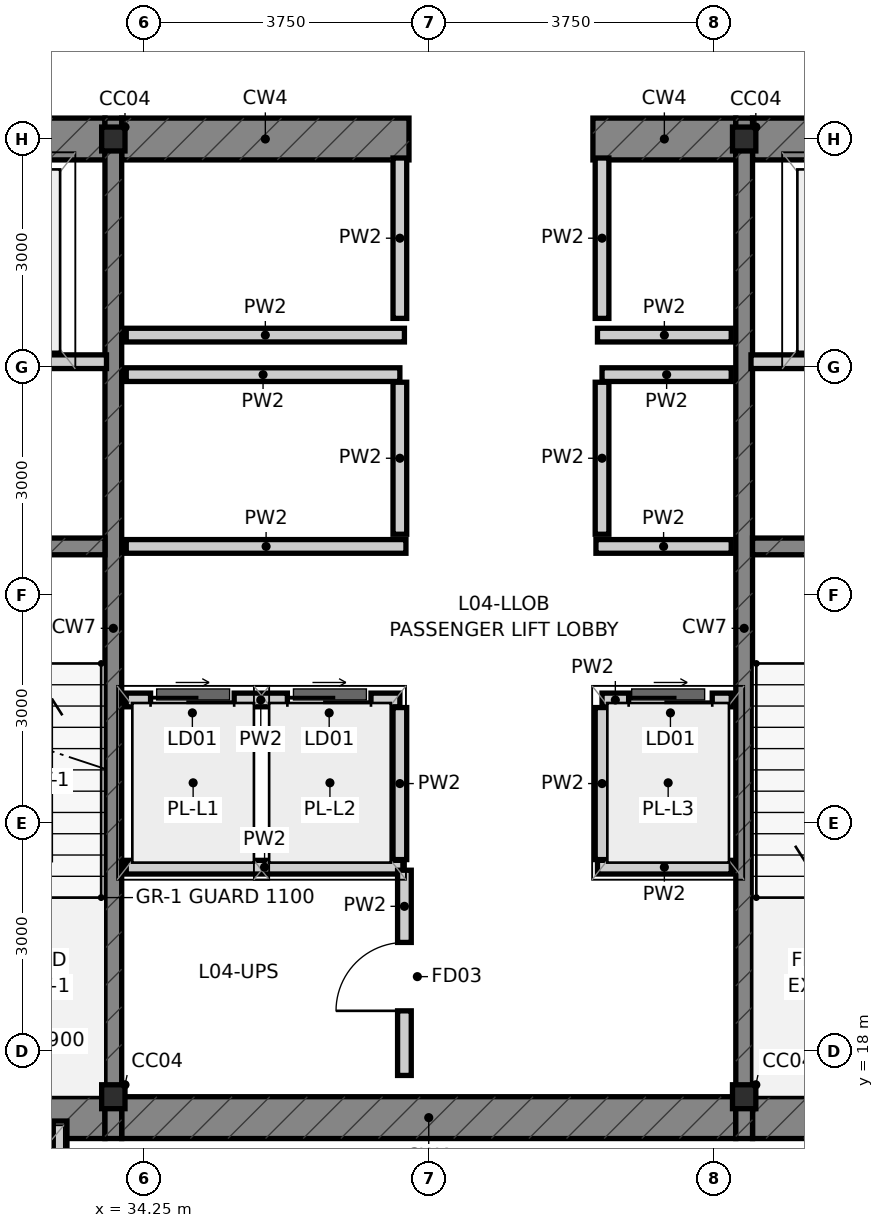
"""IFC4 building model, lengths in metres.
Left out: names, types, materials, properties, quantities, classifications, styles, units other than length and angle.
Written with IfcOpenShell. Run it as: python <this file> out.ifc"""

import sys

from ifc_helpers import new_model, si_unit, direction, frame, frame_2d, origin, origin_2d, place, context, subcontext, project, spatial, rectangle, i_section, extrude, source, transform, mapped, element, fill, save


model = new_model("IFC4")
c1 = context("Model", 3, precision=1e-05, world=origin(), true_north=direction((0.0, 1.0)))
c2 = subcontext(c1, "Body", "Model", "MODEL_VIEW")
j1 = project(units=[si_unit("LENGTHUNIT", "METRE"), si_unit("PLANEANGLEUNIT", "RADIAN")], contexts=[c1])
p1 = place(None, origin())
s1 = spatial("IfcSite", under=j1, at=p1, CompositionType="ELEMENT")
p2 = place(p1, origin())
s2 = spatial("IfcBuilding", under=s1, at=p2, CompositionType="ELEMENT")
p3 = place(p2, frame((0.0, 0.0, 18.9)))
s3 = spatial("IfcBuildingStorey", under=s2, at=p3, CompositionType="ELEMENT", Elevation=18.9)
m1 = source(origin(), c2, "Body", "SweptSolid", [
    extrude(i_section(OverallWidth=0.307, OverallDepth=0.315, WebThickness=0.012, FlangeThickness=0.019, at=origin_2d()), origin(), (0.0, 0.0, 1.0), 4.2),
])
for number, where, z_axis, x_axis in (
    (1, (33.85, 17.4, 0.0), (0.0, 0.0, 1.0), (1.0, 0.0, 0.0)),
    (2, (42.15, 17.4, 0.0), (0.0, 0.0, 1.0), (1.0, 0.0, 0.0)),
    (3, (33.85, 30.0, 0.0), (0.0, 0.0, 1.0), (1.0, 0.0, 0.0)),
    (4, (42.15, 30.0, 0.0), (0.0, 0.0, 1.0), (1.0, 0.0, 0.0)),
):
    element("IfcColumn", number, at=place(p3, frame(where, z_axis=z_axis, x_axis=x_axis)), inside=s3, PredefinedType="COLUMN", context=c2, shape_type="MappedRepresentation", body=[
        mapped(m1, transform((0.0, 0.0, 0.0), scale=1.0)),
    ])
p4 = place(p3, frame((30.84, 17.125, 0.0), z_axis=(0.0, 0.0, 1.0), x_axis=(1.0, 0.0, 0.0)))
e5 = element("IfcWall", 5, at=p4, inside=s3, PredefinedType="SHEAR", context=c2, shape_type="SweptSolid", body=[
    extrude(rectangle(XDim=2.9, YDim=0.55, at=frame_2d((1.45, 0.0))), origin(), (0.0, 0.0, 1.0), 4.2),
])
p5 = place(p3, frame((33.96, 17.125, 0.0), z_axis=(0.0, 0.0, 1.0), x_axis=(1.0, 0.0, 0.0)))
e6 = element("IfcWall", 6, at=p5, inside=s3, PredefinedType="SHEAR", context=c2, shape_type="SweptSolid", body=[
    extrude(rectangle(XDim=8.08, YDim=0.55, at=frame_2d((4.04, 0.0))), origin(), (0.0, 0.0, 1.0), 4.2),
])
for number, where, z_axis, x_axis in (
    (7, (42.26, 17.125, 0.0), (0.0, 0.0, 1.0), (1.0, 0.0, 0.0)),
    (8, (30.84, 30.0, 0.0), (0.0, 0.0, 1.0), (1.0, 0.0, 0.0)),
):
    element("IfcWall", number, at=place(p3, frame(where, z_axis=z_axis, x_axis=x_axis)), inside=s3, PredefinedType="SHEAR", context=c2, shape_type="SweptSolid", body=[
        extrude(rectangle(XDim=2.9, YDim=0.55, at=frame_2d((1.45, 0.0))), origin(), (0.0, 0.0, 1.0), 4.2),
    ])
p6 = place(p3, frame((33.96, 30.0, 0.0), z_axis=(0.0, 0.0, 1.0), x_axis=(1.0, 0.0, 0.0)))
e9 = element("IfcWall", 9, at=p6, inside=s3, PredefinedType="SHEAR", context=c2, shape_type="SweptSolid", body=[
    extrude(rectangle(XDim=3.78, YDim=0.55, at=frame_2d((1.89, 0.0))), origin(), (0.0, 0.0, 1.0), 4.2),
])
p7 = place(p3, frame((40.16, 30.0, 0.0), z_axis=(0.0, 0.0, 1.0), x_axis=(1.0, 0.0, 0.0)))
e10 = element("IfcWall", 10, at=p7, inside=s3, PredefinedType="SHEAR", context=c2, shape_type="SweptSolid", body=[
    extrude(rectangle(XDim=1.88, YDim=0.55, at=frame_2d((0.94, 0.0))), origin(), (0.0, 0.0, 1.0), 4.2),
])
p8 = place(p3, frame((42.26, 30.0, 0.0), z_axis=(0.0, 0.0, 1.0), x_axis=(1.0, 0.0, 0.0)))
e11 = element("IfcWall", 11, at=p8, inside=s3, PredefinedType="SHEAR", context=c2, shape_type="SweptSolid", body=[
    extrude(rectangle(XDim=2.9, YDim=0.55, at=frame_2d((1.45, 0.0))), origin(), (0.0, 0.0, 1.0), 4.2),
])
for number, where, z_axis, x_axis in (
    (12, (33.85, 16.85, 0.0), (0.0, 0.0, 1.0), (0.0, 1.0, 0.0)),
    (13, (42.15, 16.85, 0.0), (0.0, 0.0, 1.0), (0.0, 1.0, 0.0)),
):
    element("IfcWall", number, at=place(p3, frame(where, z_axis=z_axis, x_axis=x_axis)), inside=s3, PredefinedType="SHEAR", context=c2, shape_type="SweptSolid", body=[
        extrude(rectangle(XDim=13.425, YDim=0.22, at=frame_2d((6.712, 0.0))), origin(), (0.0, 0.0, 1.0), 4.2),
    ])
for number, where, z_axis, x_axis in (
    (14, (30.84, 24.64, 0.0), (0.0, 0.0, 1.0), (1.0, 0.0, 0.0)),
    (15, (42.26, 24.64, 0.0), (0.0, 0.0, 1.0), (1.0, 0.0, 0.0)),
):
    element("IfcWall", number, at=place(p3, frame(where, z_axis=z_axis, x_axis=x_axis)), inside=s3, PredefinedType="SHEAR", context=c2, shape_type="SweptSolid", body=[
        extrude(rectangle(XDim=2.9, YDim=0.22, at=frame_2d((1.45, 0.0))), origin(), (0.0, 0.0, 1.0), 4.2),
    ])
p9 = place(p3, frame((33.15, 14.42, 0.0), z_axis=(0.0, 0.0, 1.0), x_axis=(0.0, 1.0, 0.0)))
e16 = element("IfcWall", 16, at=p9, inside=s3, PredefinedType="PARTITIONING", context=c2, shape_type="SweptSolid", body=[
    extrude(rectangle(XDim=2.66, YDim=0.18, at=frame_2d((1.33, 0.0))), origin(), (0.0, 0.0, 1.0), 3.75),
])
p10 = place(p3, frame((34.02, 22.62, 0.0), z_axis=(0.0, 0.0, 1.0), x_axis=(1.0, 0.0, 0.0)))
e17 = element("IfcWall", 17, at=p10, inside=s3, PredefinedType="PARTITIONING", context=c2, shape_type="SweptSolid", body=[
    extrude(rectangle(XDim=3.6, YDim=0.18, at=frame_2d((1.8, 0.0))), origin(), (0.0, 0.0, 1.0), 3.75),
])
p11 = place(p10, frame((0.32, 0.0, 0.0)))
e18 = element("IfcOpeningElement", 18, at=p11, cuts=e17, PredefinedType="OPENING", context=c2, shape_type="SweptSolid", body=[
    extrude(rectangle(XDim=1.1, YDim=2.2, at=frame_2d((0.55, 1.1))), frame((0.0, 0.102, 0.0), z_axis=(0.0, -1.0, 0.0), x_axis=(1.0, 0.0, 0.0)), (0.0, 0.0, 1.0), 0.204),
])
p12 = place(p10, frame((2.12, 0.0, 0.0)))
e19 = element("IfcOpeningElement", 19, at=p12, cuts=e17, PredefinedType="OPENING", context=c2, shape_type="SweptSolid", body=[
    extrude(rectangle(XDim=1.1, YDim=2.2, at=frame_2d((0.55, 1.1))), frame((0.0, 0.102, 0.0), z_axis=(0.0, -1.0, 0.0), x_axis=(1.0, 0.0, 0.0)), (0.0, 0.0, 1.0), 0.204),
])
p13 = place(p3, frame((40.28, 22.62, 0.0), z_axis=(0.0, 0.0, 1.0), x_axis=(1.0, 0.0, 0.0)))
e20 = element("IfcWall", 20, at=p13, inside=s3, PredefinedType="PARTITIONING", context=c2, shape_type="SweptSolid", body=[
    extrude(rectangle(XDim=1.7, YDim=0.18, at=frame_2d((0.85, 0.0))), origin(), (0.0, 0.0, 1.0), 3.75),
])
p14 = place(p13, frame((0.35, 0.0, 0.0)))
e21 = element("IfcOpeningElement", 21, at=p14, cuts=e20, PredefinedType="OPENING", context=c2, shape_type="SweptSolid", body=[
    extrude(rectangle(XDim=1.1, YDim=2.2, at=frame_2d((0.55, 1.1))), frame((0.0, 0.102, 0.0), z_axis=(0.0, -1.0, 0.0), x_axis=(1.0, 0.0, 0.0)), (0.0, 0.0, 1.0), 0.204),
])
for number, where, z_axis, x_axis in (
    (22, (37.62, 20.52, 0.0), (0.0, 0.0, 1.0), (0.0, 1.0, 0.0)),
    (23, (40.28, 20.52, 0.0), (0.0, 0.0, 1.0), (0.0, 1.0, 0.0)),
):
    element("IfcWall", number, at=place(p3, frame(where, z_axis=z_axis, x_axis=x_axis)), inside=s3, PredefinedType="PARTITIONING", context=c2, shape_type="SweptSolid", body=[
        extrude(rectangle(XDim=2.0, YDim=0.18, at=frame_2d((1.0, 0.0))), origin(), (0.0, 0.0, 1.0), 3.75),
    ])
p15 = place(p3, frame((34.02, 26.9, 0.0), z_axis=(0.0, 0.0, 1.0), x_axis=(1.0, 0.0, 0.0)))
e24 = element("IfcWall", 24, at=p15, inside=s3, PredefinedType="PARTITIONING", context=c2, shape_type="SweptSolid", body=[
    extrude(rectangle(XDim=3.6, YDim=0.18, at=frame_2d((1.8, 0.0))), origin(), (0.0, 0.0, 1.0), 3.75),
])
p16 = place(p3, frame((40.28, 26.9, 0.0), z_axis=(0.0, 0.0, 1.0), x_axis=(1.0, 0.0, 0.0)))
e25 = element("IfcWall", 25, at=p16, inside=s3, PredefinedType="PARTITIONING", context=c2, shape_type="SweptSolid", body=[
    extrude(rectangle(XDim=1.7, YDim=0.18, at=frame_2d((0.85, 0.0))), origin(), (0.0, 0.0, 1.0), 3.75),
])
for number, where, z_axis, x_axis in (
    (26, (37.62, 24.8, 0.0), (0.0, 0.0, 1.0), (0.0, 1.0, 0.0)),
    (27, (40.28, 24.8, 0.0), (0.0, 0.0, 1.0), (0.0, 1.0, 0.0)),
):
    element("IfcWall", number, at=place(p3, frame(where, z_axis=z_axis, x_axis=x_axis)), inside=s3, PredefinedType="PARTITIONING", context=c2, shape_type="SweptSolid", body=[
        extrude(rectangle(XDim=2.0, YDim=0.18, at=frame_2d((1.0, 0.0))), origin(), (0.0, 0.0, 1.0), 3.75),
    ])
p17 = place(p3, frame((34.02, 24.64, 0.0), z_axis=(0.0, 0.0, 1.0), x_axis=(1.0, 0.0, 0.0)))
e28 = element("IfcWall", 28, at=p17, inside=s3, PredefinedType="PARTITIONING", context=c2, shape_type="SweptSolid", body=[
    extrude(rectangle(XDim=3.68, YDim=0.18, at=frame_2d((1.84, 0.0))), origin(), (0.0, 0.0, 1.0), 3.75),
])
p18 = place(p3, frame((40.2, 24.64, 0.0), z_axis=(0.0, 0.0, 1.0), x_axis=(1.0, 0.0, 0.0)))
e29 = element("IfcWall", 29, at=p18, inside=s3, PredefinedType="PARTITIONING", context=c2, shape_type="SweptSolid", body=[
    extrude(rectangle(XDim=1.78, YDim=0.18, at=frame_2d((0.89, 0.0))), origin(), (0.0, 0.0, 1.0), 3.75),
])
p19 = place(p3, frame((34.02, 27.42, 0.0), z_axis=(0.0, 0.0, 1.0), x_axis=(1.0, 0.0, 0.0)))
e30 = element("IfcWall", 30, at=p19, inside=s3, PredefinedType="PARTITIONING", context=c2, shape_type="SweptSolid", body=[
    extrude(rectangle(XDim=3.66, YDim=0.18, at=frame_2d((1.83, 0.0))), origin(), (0.0, 0.0, 1.0), 3.75),
])
p20 = place(p3, frame((40.22, 27.42, 0.0), z_axis=(0.0, 0.0, 1.0), x_axis=(1.0, 0.0, 0.0)))
e31 = element("IfcWall", 31, at=p20, inside=s3, PredefinedType="PARTITIONING", context=c2, shape_type="SweptSolid", body=[
    extrude(rectangle(XDim=1.76, YDim=0.18, at=frame_2d((0.88, 0.0))), origin(), (0.0, 0.0, 1.0), 3.75),
])
for number, where, z_axis, x_axis in (
    (32, (37.62, 27.64, 0.0), (0.0, 0.0, 1.0), (0.0, 1.0, 0.0)),
    (33, (40.28, 27.64, 0.0), (0.0, 0.0, 1.0), (0.0, 1.0, 0.0)),
):
    element("IfcWall", number, at=place(p3, frame(where, z_axis=z_axis, x_axis=x_axis)), inside=s3, PredefinedType="PARTITIONING", context=c2, shape_type="SweptSolid", body=[
        extrude(rectangle(XDim=2.11, YDim=0.18, at=frame_2d((1.055, 0.0))), origin(), (0.0, 0.0, 1.0), 3.75),
    ])
for number, where, z_axis, x_axis in (
    (34, (30.86, 27.07, 0.0), (0.0, 0.0, 1.0), (1.0, 0.0, 0.0)),
    (35, (42.24, 27.07, 0.0), (0.0, 0.0, 1.0), (1.0, 0.0, 0.0)),
):
    element("IfcWall", number, at=place(p3, frame(where, z_axis=z_axis, x_axis=x_axis)), inside=s3, PredefinedType="PARTITIONING", context=c2, shape_type="SweptSolid", body=[
        extrude(rectangle(XDim=2.9, YDim=0.18, at=frame_2d((1.45, 0.0))), origin(), (0.0, 0.0, 1.0), 3.75),
    ])
p21 = place(p3, frame((34.02, 20.42, 0.0), z_axis=(0.0, 0.0, 1.0), x_axis=(1.0, 0.0, 0.0)))
e36 = element("IfcWall", 36, at=p21, inside=s3, PredefinedType="PARTITIONING", context=c2, shape_type="SweptSolid", body=[
    extrude(rectangle(XDim=3.64, YDim=0.18, at=frame_2d((1.82, 0.0))), origin(), (0.0, 0.0, 1.0), 3.75),
])
p22 = place(p3, frame((40.22, 20.42, 0.0), z_axis=(0.0, 0.0, 1.0), x_axis=(1.0, 0.0, 0.0)))
e37 = element("IfcWall", 37, at=p22, inside=s3, PredefinedType="PARTITIONING", context=c2, shape_type="SweptSolid", body=[
    extrude(rectangle(XDim=1.76, YDim=0.18, at=frame_2d((0.88, 0.0))), origin(), (0.0, 0.0, 1.0), 3.75),
])
p23 = place(p3, frame((37.68, 17.68, 0.0), z_axis=(0.0, 0.0, 1.0), x_axis=(0.0, 1.0, 0.0)))
e38 = element("IfcWall", 38, at=p23, inside=s3, PredefinedType="PARTITIONING", context=c2, shape_type="SweptSolid", body=[
    extrude(rectangle(XDim=2.7, YDim=0.18, at=frame_2d((1.35, 0.0))), origin(), (0.0, 0.0, 1.0), 3.75),
])
p24 = place(p23, frame((0.85, 0.0, 0.0)))
e39 = element("IfcOpeningElement", 39, at=p24, cuts=e38, PredefinedType="OPENING", context=c2, shape_type="SweptSolid", body=[
    extrude(rectangle(XDim=0.9, YDim=2.1, at=frame_2d((0.45, 1.05))), frame((0.0, 0.102, 0.0), z_axis=(0.0, -1.0, 0.0), x_axis=(1.0, 0.0, 0.0)), (0.0, 0.0, 1.0), 0.204),
])
p25 = place(p11, origin())
e40 = element("IfcDoor", 40, at=p25, inside=s3, OperationType="SLIDING_TO_LEFT", PredefinedType="DOOR", context=c2, shape_type="SweptSolid", body=[
    extrude(rectangle(XDim=1.1, YDim=2.2, at=frame_2d((0.55, 1.1))), frame((0.0, 0.025, 0.0), z_axis=(0.0, -1.0, 0.0), x_axis=(1.0, 0.0, 0.0)), (0.0, 0.0, 1.0), 0.05),
])
fill(e18, e40)
p26 = place(p12, origin())
e41 = element("IfcDoor", 41, at=p26, inside=s3, OperationType="SLIDING_TO_RIGHT", PredefinedType="DOOR", context=c2, shape_type="SweptSolid", body=[
    extrude(rectangle(XDim=1.1, YDim=2.2, at=frame_2d((0.55, 1.1))), frame((0.0, 0.025, 0.0), z_axis=(0.0, -1.0, 0.0), x_axis=(1.0, 0.0, 0.0)), (0.0, 0.0, 1.0), 0.05),
])
fill(e19, e41)
p27 = place(p14, origin())
e42 = element("IfcDoor", 42, at=p27, inside=s3, OperationType="SLIDING_TO_LEFT", PredefinedType="DOOR", context=c2, shape_type="SweptSolid", body=[
    extrude(rectangle(XDim=1.1, YDim=2.2, at=frame_2d((0.55, 1.1))), frame((0.0, 0.025, 0.0), z_axis=(0.0, -1.0, 0.0), x_axis=(1.0, 0.0, 0.0)), (0.0, 0.0, 1.0), 0.05),
])
fill(e21, e42)
p28 = place(p24, origin())
e43 = element("IfcDoor", 43, at=p28, inside=s3, OperationType="SINGLE_SWING_LEFT", PredefinedType="DOOR", context=c2, shape_type="SweptSolid", body=[
    extrude(rectangle(XDim=0.9, YDim=2.1, at=frame_2d((0.45, 1.05))), frame((0.0, 0.025, 0.0), z_axis=(0.0, -1.0, 0.0), x_axis=(1.0, 0.0, 0.0)), (0.0, 0.0, 1.0), 0.05),
])
fill(e39, e43)
save(model, sys.argv[1])
